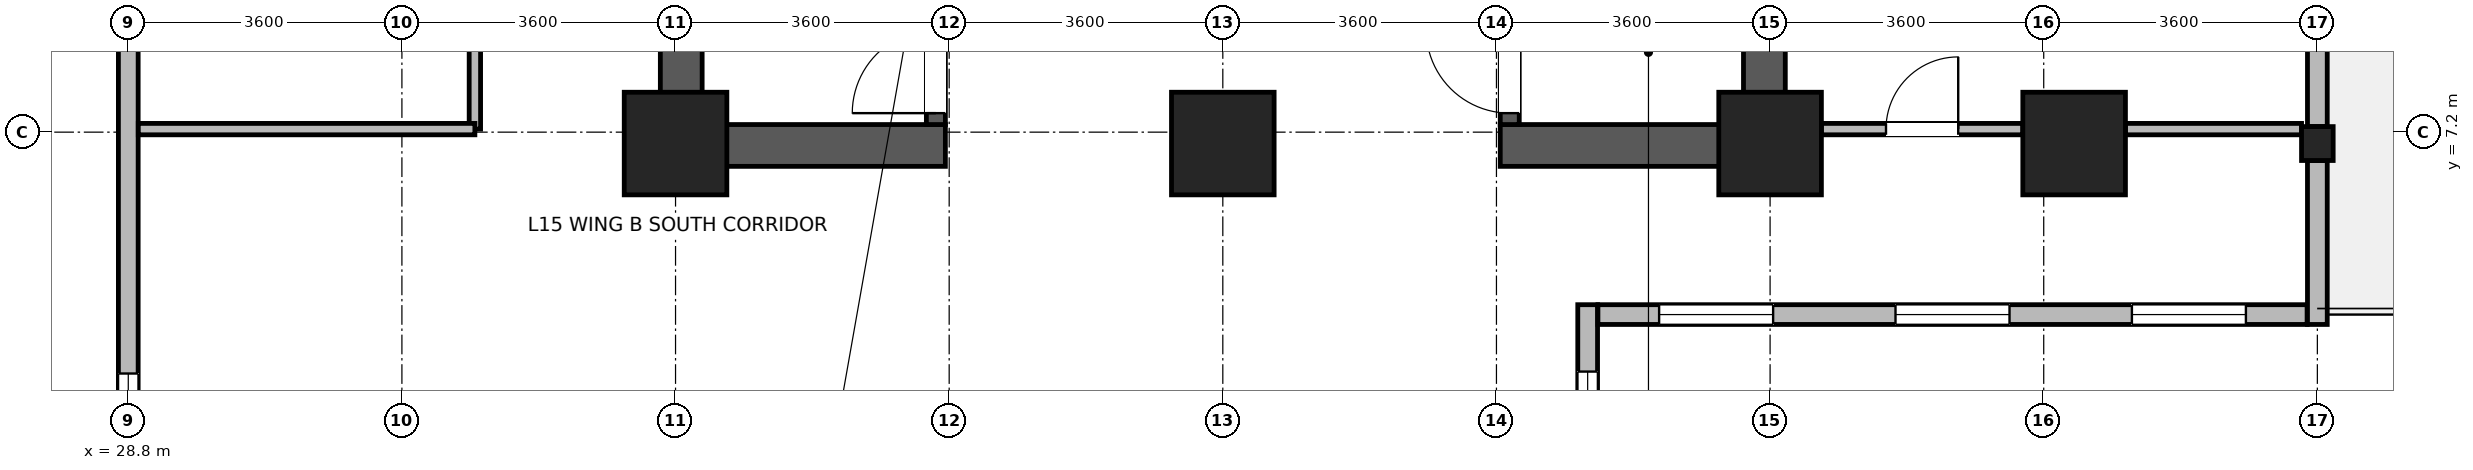
"""IFC4 building model, lengths in metres.
Left out: names, types, materials, properties, quantities, classifications, styles, units other than length and angle.
Written with IfcOpenShell. Run it as: python <this file> out.ifc"""

import sys

from ifc_helpers import new_model, si_unit, direction, frame, frame_2d, origin, origin_2d, place, context, subcontext, project, spatial, rectangle, i_section, extrude, source, transform, mapped, element, fill, save


model = new_model("IFC4")
c1 = context("Model", 3, precision=1e-05, world=origin(), true_north=direction((0.0, 1.0)))
c2 = subcontext(c1, "Body", "Model", "MODEL_VIEW")
j1 = project(units=[si_unit("LENGTHUNIT", "METRE"), si_unit("PLANEANGLEUNIT", "RADIAN")], contexts=[c1])
p1 = place(None, origin())
s1 = spatial("IfcSite", under=j1, at=p1, CompositionType="ELEMENT")
p2 = place(p1, origin())
s2 = spatial("IfcBuilding", under=s1, at=p2, CompositionType="ELEMENT")
p3 = place(p2, frame((0.0, 0.0, 62.3)))
s3 = spatial("IfcBuildingStorey", under=s2, at=p3, CompositionType="ELEMENT", Elevation=62.3)
for number, where, z_axis, x_axis in (
    (1, (36.075, 6.75, 0.0), (0.0, 0.0, 1.0), (0.0, 1.0, 0.0)),
    (2, (50.325, 6.75, 0.0), (0.0, 0.0, 1.0), (0.0, 1.0, 0.0)),
):
    element("IfcWall", number, at=place(p3, frame(where, z_axis=z_axis, x_axis=x_axis)), inside=s3, PredefinedType="SHEAR", context=c2, shape_type="SweptSolid", body=[
        extrude(rectangle(XDim=8.1, YDim=0.55, at=frame_2d((4.05, 0.0))), origin(), (0.0, 0.0, 1.0), 3.45),
    ])
for number, where, z_axis, x_axis in (
    (3, (36.35, 7.025, 0.0), (0.0, 0.0, 1.0), (1.0, 0.0, 0.0)),
    (4, (46.85, 7.025, 0.0), (0.0, 0.0, 1.0), (1.0, 0.0, 0.0)),
):
    element("IfcWall", number, at=place(p3, frame(where, z_axis=z_axis, x_axis=x_axis)), inside=s3, PredefinedType="SHEAR", context=c2, shape_type="SweptSolid", body=[
        extrude(rectangle(XDim=3.2, YDim=0.55, at=frame_2d((1.6, 0.0))), origin(), (0.0, 0.0, 1.0), 3.45),
    ])
p4 = place(p3, frame((39.425, 7.3, 0.0), z_axis=(0.0, 0.0, 1.0), x_axis=(0.0, 1.0, 0.0)))
e5 = element("IfcWall", 5, at=p4, inside=s3, PredefinedType="SHEAR", context=c2, shape_type="SweptSolid", body=[
    extrude(rectangle(XDim=7.0, YDim=0.25, at=frame_2d((3.5, 0.0))), origin(), (0.0, 0.0, 1.0), 3.45),
])
p5 = place(p4, frame((0.15, 0.0, 0.0)))
e6 = element("IfcOpeningElement", 6, at=p5, cuts=e5, PredefinedType="OPENING", context=c2, shape_type="SweptSolid", body=[
    extrude(rectangle(XDim=1.1, YDim=2.08, at=frame_2d((0.55, 1.04))), frame((0.0, 0.135, 0.0), z_axis=(0.0, -1.0, 0.0), x_axis=(1.0, 0.0, 0.0)), (0.0, 0.0, 1.0), 0.27),
])
p6 = place(p3, frame((46.975, 7.3, 0.0), z_axis=(0.0, 0.0, 1.0), x_axis=(0.0, 1.0, 0.0)))
e7 = element("IfcWall", 7, at=p6, inside=s3, PredefinedType="SHEAR", context=c2, shape_type="SweptSolid", body=[
    extrude(rectangle(XDim=7.0, YDim=0.25, at=frame_2d((3.5, 0.0))), origin(), (0.0, 0.0, 1.0), 3.45),
])
p7 = place(p6, frame((0.15, 0.0, 0.0)))
e8 = element("IfcOpeningElement", 8, at=p7, cuts=e7, PredefinedType="OPENING", context=c2, shape_type="SweptSolid", body=[
    extrude(rectangle(XDim=1.1, YDim=2.08, at=frame_2d((0.55, 1.04))), frame((0.0, 0.135, 0.0), z_axis=(0.0, -1.0, 0.0), x_axis=(1.0, 0.0, 0.0)), (0.0, 0.0, 1.0), 0.27),
])
m1 = source(origin(), c2, "Body", "SweptSolid", [
    extrude(rectangle(XDim=1.35, YDim=1.35, at=origin_2d()), origin(), (0.0, 0.0, 1.0), 3.7),
])
for number, where, z_axis, x_axis in (
    (9, (36.0, 7.05, 0.0), (0.0, 0.0, 1.0), (1.0, 0.0, 0.0)),
    (10, (43.2, 7.05, 0.0), (0.0, 0.0, 1.0), (1.0, 0.0, 0.0)),
    (11, (50.4, 7.05, 0.0), (0.0, 0.0, 1.0), (1.0, 0.0, 0.0)),
    (12, (54.4, 7.05, 0.0), (0.0, 0.0, 1.0), (1.0, 0.0, 0.0)),
):
    element("IfcColumn", number, at=place(p3, frame(where, z_axis=z_axis, x_axis=x_axis)), inside=s3, PredefinedType="COLUMN", context=c2, shape_type="MappedRepresentation", body=[
        mapped(m1, transform((0.0, 0.0, 0.0), x_axis=(1.0, 0.0, 0.0), y_axis=(0.0, 1.0, 0.0), z_axis=(0.0, 0.0, 1.0), scale=1.0)),
    ])
m2 = source(origin(), c2, "Body", "SweptSolid", [
    extrude(i_section(OverallWidth=0.416, OverallDepth=0.446, WebThickness=0.029, FlangeThickness=0.04, FilletRadius=0.015, at=origin_2d()), origin(), (0.0, 0.0, 1.0), 3.7),
])
p8 = place(p3, frame((57.6, 7.05, 0.0), z_axis=(0.0, 0.0, 1.0), x_axis=(1.0, 0.0, 0.0)))
e13 = element("IfcColumn", 13, at=p8, inside=s3, PredefinedType="COLUMN", context=c2, shape_type="MappedRepresentation", body=[
    mapped(m2, transform((0.0, 0.0, 0.0), x_axis=(1.0, 0.0, 0.0), y_axis=(0.0, 1.0, 0.0), z_axis=(0.0, 0.0, 1.0), scale=1.0)),
])
p9 = place(p3, frame((48.0, 4.93, 0.0), z_axis=(0.0, 0.0, 1.0), x_axis=(0.0, -1.0, 0.0)))
e14 = element("IfcWall", 14, at=p9, inside=s3, PredefinedType="STANDARD", context=c2, shape_type="SweptSolid", body=[
    extrude(rectangle(XDim=3.26, YDim=0.26, at=frame_2d((1.63, 0.0))), origin(), (0.0, 0.0, 1.0), 3.43),
])
p10 = place(p9, frame((0.88, 0.0, 0.85)))
e15 = element("IfcOpeningElement", 15, at=p10, cuts=e14, PredefinedType="OPENING", context=c2, shape_type="SweptSolid", body=[
    extrude(rectangle(XDim=1.5, YDim=1.85, at=frame_2d((0.75, 0.925))), frame((0.0, 0.14, 0.0), z_axis=(0.0, -1.0, 0.0), x_axis=(1.0, 0.0, 0.0)), (0.0, 0.0, 1.0), 0.28),
])
p11 = place(p3, frame((57.465, 4.8, 0.0), z_axis=(0.0, 0.0, 1.0), x_axis=(-1.0, 0.0, 0.0)))
e16 = element("IfcWall", 16, at=p11, inside=s3, PredefinedType="STANDARD", context=c2, shape_type="SweptSolid", body=[
    extrude(rectangle(XDim=9.33, YDim=0.26, at=frame_2d((4.665, 0.0))), origin(), (0.0, 0.0, 1.0), 3.43),
])
p12 = place(p11, frame((0.805, 0.0, 0.85)))
e17 = element("IfcOpeningElement", 17, at=p12, cuts=e16, PredefinedType="OPENING", context=c2, shape_type="SweptSolid", body=[
    extrude(rectangle(XDim=1.5, YDim=1.85, at=frame_2d((0.75, 0.925))), frame((0.0, 0.14, 0.0), z_axis=(0.0, -1.0, 0.0), x_axis=(1.0, 0.0, 0.0)), (0.0, 0.0, 1.0), 0.28),
])
p13 = place(p11, frame((3.915, 0.0, 0.85)))
e18 = element("IfcOpeningElement", 18, at=p13, cuts=e16, PredefinedType="OPENING", context=c2, shape_type="SweptSolid", body=[
    extrude(rectangle(XDim=1.5, YDim=1.85, at=frame_2d((0.75, 0.925))), frame((0.0, 0.14, 0.0), z_axis=(0.0, -1.0, 0.0), x_axis=(1.0, 0.0, 0.0)), (0.0, 0.0, 1.0), 0.28),
])
p14 = place(p11, frame((7.025, 0.0, 0.85)))
e19 = element("IfcOpeningElement", 19, at=p14, cuts=e16, PredefinedType="OPENING", context=c2, shape_type="SweptSolid", body=[
    extrude(rectangle(XDim=1.5, YDim=1.85, at=frame_2d((0.75, 0.925))), frame((0.0, 0.14, 0.0), z_axis=(0.0, -1.0, 0.0), x_axis=(1.0, 0.0, 0.0)), (0.0, 0.0, 1.0), 0.28),
])
p15 = place(p3, frame((57.6, 6.826, 0.0), z_axis=(0.0, 0.0, 1.0), x_axis=(0.0, -1.0, 0.0)))
e20 = element("IfcWall", 20, at=p15, inside=s3, PredefinedType="STANDARD", context=c2, shape_type="SweptSolid", body=[
    extrude(rectangle(XDim=2.156, YDim=0.26, at=frame_2d((1.078, 0.0))), origin(), (0.0, 0.0, 1.0), 3.43),
])
p16 = place(p3, frame((57.6, 14.326, 0.0), z_axis=(0.0, 0.0, 1.0), x_axis=(0.0, -1.0, 0.0)))
e21 = element("IfcWall", 21, at=p16, inside=s3, PredefinedType="STANDARD", context=c2, shape_type="SweptSolid", body=[
    extrude(rectangle(XDim=7.052, YDim=0.26, at=frame_2d((3.526, 0.0))), origin(), (0.0, 0.0, 1.0), 2.93),
])
p17 = place(p16, frame((2.776, 0.0, 0.0)))
e22 = element("IfcOpeningElement", 22, at=p17, cuts=e21, PredefinedType="OPENING", context=c2, shape_type="SweptSolid", body=[
    extrude(rectangle(XDim=1.5, YDim=2.15, at=frame_2d((0.75, 1.075))), frame((0.0, 0.14, 0.0), z_axis=(0.0, -1.0, 0.0), x_axis=(1.0, 0.0, 0.0)), (0.0, 0.0, 1.0), 0.28),
])
p18 = place(p16, frame((1.013, 0.0, 0.85)))
e23 = element("IfcOpeningElement", 23, at=p18, cuts=e21, PredefinedType="OPENING", context=c2, shape_type="SweptSolid", body=[
    extrude(rectangle(XDim=1.5, YDim=1.85, at=frame_2d((0.75, 0.925))), frame((0.0, 0.14, 0.0), z_axis=(0.0, -1.0, 0.0), x_axis=(1.0, 0.0, 0.0)), (0.0, 0.0, 1.0), 0.28),
])
p19 = place(p16, frame((4.539, 0.0, 0.85)))
e24 = element("IfcOpeningElement", 24, at=p19, cuts=e21, PredefinedType="OPENING", context=c2, shape_type="SweptSolid", body=[
    extrude(rectangle(XDim=1.5, YDim=1.85, at=frame_2d((0.75, 0.925))), frame((0.0, 0.14, 0.0), z_axis=(0.0, -1.0, 0.0), x_axis=(1.0, 0.0, 0.0)), (0.0, 0.0, 1.0), 0.28),
])
p20 = place(p3, frame((28.8, 1.67, 0.0), z_axis=(0.0, 0.0, 1.0), x_axis=(0.0, 1.0, 0.0)))
e25 = element("IfcWall", 25, at=p20, inside=s3, PredefinedType="STANDARD", context=c2, shape_type="SweptSolid", body=[
    extrude(rectangle(XDim=19.254, YDim=0.26, at=frame_2d((9.627, 0.0))), origin(), (0.0, 0.0, 1.0), 3.43),
])
p21 = place(p20, frame((0.854, 0.0, 0.85)))
e26 = element("IfcOpeningElement", 26, at=p21, cuts=e25, PredefinedType="OPENING", context=c2, shape_type="SweptSolid", body=[
    extrude(rectangle(XDim=1.5, YDim=1.85, at=frame_2d((0.75, 0.925))), frame((0.0, 0.14, 0.0), z_axis=(0.0, -1.0, 0.0), x_axis=(1.0, 0.0, 0.0)), (0.0, 0.0, 1.0), 0.28),
])
p22 = place(p20, frame((7.272, 0.0, 0.85)))
e27 = element("IfcOpeningElement", 27, at=p22, cuts=e25, PredefinedType="OPENING", context=c2, shape_type="SweptSolid", body=[
    extrude(rectangle(XDim=1.5, YDim=1.85, at=frame_2d((0.75, 0.925))), frame((0.0, 0.14, 0.0), z_axis=(0.0, -1.0, 0.0), x_axis=(1.0, 0.0, 0.0)), (0.0, 0.0, 1.0), 0.28),
])
p23 = place(p20, frame((10.481, 0.0, 0.85)))
e28 = element("IfcOpeningElement", 28, at=p23, cuts=e25, PredefinedType="OPENING", context=c2, shape_type="SweptSolid", body=[
    extrude(rectangle(XDim=1.5, YDim=1.85, at=frame_2d((0.75, 0.925))), frame((0.0, 0.14, 0.0), z_axis=(0.0, -1.0, 0.0), x_axis=(1.0, 0.0, 0.0)), (0.0, 0.0, 1.0), 0.28),
])
p24 = place(p20, frame((13.69, 0.0, 0.85)))
e29 = element("IfcOpeningElement", 29, at=p24, cuts=e25, PredefinedType="OPENING", context=c2, shape_type="SweptSolid", body=[
    extrude(rectangle(XDim=1.5, YDim=1.85, at=frame_2d((0.75, 0.925))), frame((0.0, 0.14, 0.0), z_axis=(0.0, -1.0, 0.0), x_axis=(1.0, 0.0, 0.0)), (0.0, 0.0, 1.0), 0.28),
])
p25 = place(p20, frame((16.899, 0.0, 0.85)))
e30 = element("IfcOpeningElement", 30, at=p25, cuts=e25, PredefinedType="OPENING", context=c2, shape_type="SweptSolid", body=[
    extrude(rectangle(XDim=1.5, YDim=1.85, at=frame_2d((0.75, 0.925))), frame((0.0, 0.14, 0.0), z_axis=(0.0, -1.0, 0.0), x_axis=(1.0, 0.0, 0.0)), (0.0, 0.0, 1.0), 0.28),
])
p26 = place(p3, frame((33.36, 7.24, 0.0), z_axis=(0.0, 0.0, 1.0), x_axis=(0.0, 1.0, 0.0)))
e31 = element("IfcWall", 31, at=p26, inside=s3, PredefinedType="PARTITIONING", context=c2, shape_type="SweptSolid", body=[
    extrude(rectangle(XDim=7.26, YDim=0.15, at=frame_2d((3.63, 0.0))), origin(), (0.0, 0.0, 1.0), 3.43),
])
p27 = place(p26, frame((2.98, 0.0, 0.0)))
e32 = element("IfcOpeningElement", 32, at=p27, cuts=e31, PredefinedType="OPENING", context=c2, shape_type="SweptSolid", body=[
    extrude(rectangle(XDim=1.3, YDim=2.12, at=frame_2d((0.65, 1.06))), frame((0.0, 0.085, 0.0), z_axis=(0.0, -1.0, 0.0), x_axis=(1.0, 0.0, 0.0)), (0.0, 0.0, 1.0), 0.17),
])
p28 = place(p3, frame((51.075, 7.24, 0.0), z_axis=(0.0, 0.0, 1.0), x_axis=(1.0, 0.0, 0.0)))
e33 = element("IfcWall", 33, at=p28, inside=s3, PredefinedType="PARTITIONING", context=c2, shape_type="SweptSolid", body=[
    extrude(rectangle(XDim=2.65, YDim=0.15, at=frame_2d((1.325, 0.0))), origin(), (0.0, 0.0, 1.0), 2.78),
])
p29 = place(p28, frame((0.85, 0.0, 0.0)))
e34 = element("IfcOpeningElement", 34, at=p29, cuts=e33, PredefinedType="OPENING", context=c2, shape_type="SweptSolid", body=[
    extrude(rectangle(XDim=0.95, YDim=2.1, at=frame_2d((0.475, 1.05))), frame((0.0, 0.085, 0.0), z_axis=(0.0, -1.0, 0.0), x_axis=(1.0, 0.0, 0.0)), (0.0, 0.0, 1.0), 0.17),
])
p30 = place(p3, frame((55.075, 7.24, 0.0), z_axis=(0.0, 0.0, 1.0), x_axis=(1.0, 0.0, 0.0)))
e35 = element("IfcWall", 35, at=p30, inside=s3, PredefinedType="PARTITIONING", context=c2, shape_type="SweptSolid", body=[
    extrude(rectangle(XDim=2.317, YDim=0.15, at=frame_2d((1.159, 0.0))), origin(), (0.0, 0.0, 1.0), 2.78),
])
p31 = place(p3, frame((28.932, 7.24, 0.0), z_axis=(0.0, 0.0, 1.0), x_axis=(1.0, 0.0, 0.0)))
e36 = element("IfcWall", 36, at=p31, inside=s3, PredefinedType="PARTITIONING", context=c2, shape_type="SweptSolid", body=[
    extrude(rectangle(XDim=4.428, YDim=0.15, at=frame_2d((2.214, 0.0))), origin(), (0.0, 0.0, 1.0), 3.43),
])
p32 = place(p10, origin())
e37 = element("IfcWindow", 37, at=p32, inside=s3, PartitioningType="SINGLE_PANEL", PredefinedType="WINDOW", context=c2, shape_type="SweptSolid", body=[
    extrude(rectangle(XDim=1.5, YDim=1.85, at=frame_2d((0.75, 0.925))), frame((0.0, 0.03, 0.0), z_axis=(0.0, -1.0, 0.0), x_axis=(1.0, 0.0, 0.0)), (0.0, 0.0, 1.0), 0.06),
])
fill(e15, e37)
p33 = place(p12, origin())
e38 = element("IfcWindow", 38, at=p33, inside=s3, PartitioningType="SINGLE_PANEL", PredefinedType="WINDOW", context=c2, shape_type="SweptSolid", body=[
    extrude(rectangle(XDim=1.5, YDim=1.85, at=frame_2d((0.75, 0.925))), frame((0.0, 0.03, 0.0), z_axis=(0.0, -1.0, 0.0), x_axis=(1.0, 0.0, 0.0)), (0.0, 0.0, 1.0), 0.06),
])
fill(e17, e38)
p34 = place(p13, origin())
e39 = element("IfcWindow", 39, at=p34, inside=s3, PartitioningType="SINGLE_PANEL", PredefinedType="WINDOW", context=c2, shape_type="SweptSolid", body=[
    extrude(rectangle(XDim=1.5, YDim=1.85, at=frame_2d((0.75, 0.925))), frame((0.0, 0.03, 0.0), z_axis=(0.0, -1.0, 0.0), x_axis=(1.0, 0.0, 0.0)), (0.0, 0.0, 1.0), 0.06),
])
fill(e18, e39)
p35 = place(p14, origin())
e40 = element("IfcWindow", 40, at=p35, inside=s3, PartitioningType="SINGLE_PANEL", PredefinedType="WINDOW", context=c2, shape_type="SweptSolid", body=[
    extrude(rectangle(XDim=1.5, YDim=1.85, at=frame_2d((0.75, 0.925))), frame((0.0, 0.03, 0.0), z_axis=(0.0, -1.0, 0.0), x_axis=(1.0, 0.0, 0.0)), (0.0, 0.0, 1.0), 0.06),
])
fill(e19, e40)
p36 = place(p21, origin())
e41 = element("IfcWindow", 41, at=p36, inside=s3, PartitioningType="SINGLE_PANEL", PredefinedType="WINDOW", context=c2, shape_type="SweptSolid", body=[
    extrude(rectangle(XDim=1.5, YDim=1.85, at=frame_2d((0.75, 0.925))), frame((0.0, 0.03, 0.0), z_axis=(0.0, -1.0, 0.0), x_axis=(1.0, 0.0, 0.0)), (0.0, 0.0, 1.0), 0.06),
])
fill(e26, e41)
p37 = place(p5, origin())
e42 = element("IfcDoor", 42, at=p37, inside=s3, OperationType="SINGLE_SWING_LEFT", PredefinedType="DOOR", context=c2, shape_type="SweptSolid", body=[
    extrude(rectangle(XDim=1.1, YDim=2.08, at=frame_2d((0.55, 1.04))), frame((0.0, 0.025, 0.0), z_axis=(0.0, -1.0, 0.0), x_axis=(1.0, 0.0, 0.0)), (0.0, 0.0, 1.0), 0.05),
])
fill(e6, e42)
p38 = place(p7, origin())
e43 = element("IfcDoor", 43, at=p38, inside=s3, OperationType="SINGLE_SWING_RIGHT", PredefinedType="DOOR", context=c2, shape_type="SweptSolid", body=[
    extrude(rectangle(XDim=1.1, YDim=2.08, at=frame_2d((0.55, 1.04))), frame((0.0, 0.025, 0.0), z_axis=(0.0, -1.0, 0.0), x_axis=(1.0, 0.0, 0.0)), (0.0, 0.0, 1.0), 0.05),
])
fill(e8, e43)
p39 = place(p29, origin())
e44 = element("IfcDoor", 44, at=p39, inside=s3, OperationType="SINGLE_SWING_RIGHT", PredefinedType="DOOR", context=c2, shape_type="SweptSolid", body=[
    extrude(rectangle(XDim=0.95, YDim=2.1, at=frame_2d((0.475, 1.05))), frame((0.0, 0.025, 0.0), z_axis=(0.0, -1.0, 0.0), x_axis=(1.0, 0.0, 0.0)), (0.0, 0.0, 1.0), 0.05),
])
fill(e34, e44)
save(model, sys.argv[1])
